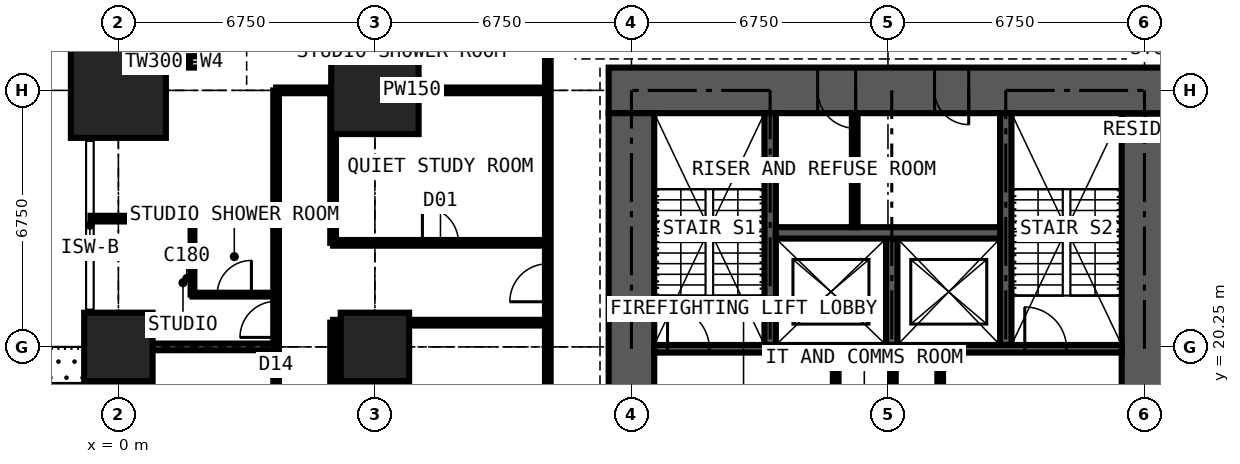
"""IFC4 building model, lengths in metres.
Left out: names, types, materials, properties, quantities, classifications, styles, units other than length and angle.
Written with IfcOpenShell. Run it as: python <this file> out.ifc"""

import sys

from ifc_helpers import new_model, si_unit, direction, frame, frame_2d, origin, origin_2d, place, context, subcontext, project, spatial, rectangle, extrude, element, fill, save


model = new_model("IFC4")
c1 = context("Model", 3, precision=1e-05, world=origin(), true_north=direction((0.0, 1.0)))
c2 = subcontext(c1, "Body", "Model", "MODEL_VIEW")
j1 = project(units=[si_unit("LENGTHUNIT", "METRE"), si_unit("PLANEANGLEUNIT", "RADIAN")], contexts=[c1])
p1 = place(None, origin())
s1 = spatial("IfcSite", under=j1, at=p1, CompositionType="ELEMENT")
p2 = place(p1, origin())
s2 = spatial("IfcBuilding", under=s1, at=p2, CompositionType="ELEMENT")
p3 = place(p2, frame((0.0, 0.0, 80.1)))
s3 = spatial("IfcBuildingStorey", under=s2, at=p3, CompositionType="ELEMENT", Elevation=80.1)
p4 = place(p3, frame((0.0, 20.25, 0.0), z_axis=(0.0, 0.0, 1.0), x_axis=(1.0, 0.0, 0.0)))
e1 = element("IfcColumn", 1, at=p4, inside=s3, PredefinedType="COLUMN", context=c2, shape_type="SweptSolid", body=[
    extrude(rectangle(XDim=1.8, YDim=1.8, at=origin_2d()), origin(), (0.0, 0.0, 1.0), 3.6),
])
p5 = place(p3, frame((0.0, 27.0, 0.0), z_axis=(0.0, 0.0, 1.0), x_axis=(1.0, 0.0, 0.0)))
e2 = element("IfcColumn", 2, at=p5, inside=s3, PredefinedType="COLUMN", context=c2, shape_type="SweptSolid", body=[
    extrude(rectangle(XDim=2.5, YDim=2.5, at=origin_2d()), origin(), (0.0, 0.0, 1.0), 3.6),
])
p6 = place(p3, frame((6.75, 20.25, 0.0), z_axis=(0.0, 0.0, 1.0), x_axis=(1.0, 0.0, 0.0)))
e3 = element("IfcColumn", 3, at=p6, inside=s3, PredefinedType="COLUMN", context=c2, shape_type="SweptSolid", body=[
    extrude(rectangle(XDim=1.8, YDim=1.8, at=origin_2d()), origin(), (0.0, 0.0, 1.0), 3.6),
])
p7 = place(p3, frame((6.75, 27.0, 0.0), z_axis=(0.0, 0.0, 1.0), x_axis=(1.0, 0.0, 0.0)))
e4 = element("IfcColumn", 4, at=p7, inside=s3, PredefinedType="COLUMN", context=c2, shape_type="SweptSolid", body=[
    extrude(rectangle(XDim=2.3, YDim=2.3, at=origin_2d()), origin(), (0.0, 0.0, 1.0), 3.6),
])
p8 = place(p3, frame((27.0, 14.1, 0.0), z_axis=(0.0, 0.0, 1.0), x_axis=(0.0, 1.0, 0.0)))
e5 = element("IfcWall", 5, at=p8, inside=s3, PredefinedType="SHEAR", context=c2, shape_type="SweptSolid", body=[
    extrude(rectangle(XDim=12.3, YDim=1.2, at=frame_2d((6.15, 0.0))), origin(), (0.0, 0.0, 1.0), 3.6),
])
p9 = place(p8, frame((3.65, 0.0, 0.0)))
e6 = element("IfcOpeningElement", 6, at=p9, cuts=e5, PredefinedType="OPENING", context=c2, shape_type="SweptSolid", body=[
    extrude(rectangle(XDim=1.2, YDim=2.2, at=frame_2d((0.6, 1.1))), frame((0.0, 0.61, 0.0), z_axis=(0.0, -1.0, 0.0), x_axis=(1.0, 0.0, 0.0)), (0.0, 0.0, 1.0), 1.22),
])
p10 = place(p3, frame((27.6, 27.0, 0.0), z_axis=(0.0, 0.0, 1.0), x_axis=(-1.0, 0.0, 0.0)))
e7 = element("IfcWall", 7, at=p10, inside=s3, PredefinedType="SHEAR", context=c2, shape_type="SweptSolid", body=[
    extrude(rectangle(XDim=14.7, YDim=1.2, at=frame_2d((7.35, 0.0))), origin(), (0.0, 0.0, 1.0), 3.6),
])
p11 = place(p10, frame((5.225, 0.0, 0.0)))
e8 = element("IfcOpeningElement", 8, at=p11, cuts=e7, PredefinedType="OPENING", context=c2, shape_type="SweptSolid", body=[
    extrude(rectangle(XDim=0.9, YDim=2.2, at=frame_2d((0.45, 1.1))), frame((0.0, 0.61, 0.0), z_axis=(0.0, -1.0, 0.0), x_axis=(1.0, 0.0, 0.0)), (0.0, 0.0, 1.0), 1.22),
])
p12 = place(p10, frame((8.2, 0.0, 0.0)))
e9 = element("IfcOpeningElement", 9, at=p12, cuts=e7, PredefinedType="OPENING", context=c2, shape_type="SweptSolid", body=[
    extrude(rectangle(XDim=1.0, YDim=2.2, at=frame_2d((0.5, 1.1))), frame((0.0, 0.61, 0.0), z_axis=(0.0, -1.0, 0.0), x_axis=(1.0, 0.0, 0.0)), (0.0, 0.0, 1.0), 1.22),
])
p13 = place(p3, frame((13.5, 26.4, 0.0), z_axis=(0.0, 0.0, 1.0), x_axis=(0.0, -1.0, 0.0)))
e10 = element("IfcWall", 10, at=p13, inside=s3, PredefinedType="SHEAR", context=c2, shape_type="SweptSolid", body=[
    extrude(rectangle(XDim=12.3, YDim=1.2, at=frame_2d((6.15, 0.0))), origin(), (0.0, 0.0, 1.0), 3.6),
])
p14 = place(p13, frame((7.45, 0.0, 0.0)))
e11 = element("IfcOpeningElement", 11, at=p14, cuts=e10, PredefinedType="OPENING", context=c2, shape_type="SweptSolid", body=[
    extrude(rectangle(XDim=1.2, YDim=2.2, at=frame_2d((0.6, 1.1))), frame((0.0, 0.61, 0.0), z_axis=(0.0, -1.0, 0.0), x_axis=(1.0, 0.0, 0.0)), (0.0, 0.0, 1.0), 1.22),
])
p15 = place(p3, frame((2.625, 31.125, 0.0), z_axis=(0.0, 0.0, 1.0), x_axis=(0.0, -1.0, 0.0)))
e12 = element("IfcWall", 12, at=p15, inside=s3, PredefinedType="SOLIDWALL", context=c2, shape_type="SweptSolid", body=[
    extrude(rectangle(XDim=3.375, YDim=0.3, at=frame_2d((1.688, 0.0))), origin(), (0.0, 0.0, 1.0), 3.375),
])
p16 = place(p15, frame((0.788, 0.0, 0.6)))
e13 = element("IfcOpeningElement", 13, at=p16, cuts=e12, PredefinedType="OPENING", context=c2, shape_type="SweptSolid", body=[
    extrude(rectangle(XDim=1.8, YDim=2.1, at=frame_2d((0.9, 1.05))), frame((0.0, 0.16, 0.0), z_axis=(0.0, -1.0, 0.0), x_axis=(1.0, 0.0, 0.0)), (0.0, 0.0, 1.0), 0.32),
])
p17 = place(p3, frame((2.625, 27.75, 0.0), z_axis=(0.0, 0.0, 1.0), x_axis=(-1.0, 0.0, 0.0)))
e14 = element("IfcWall", 14, at=p17, inside=s3, PredefinedType="SOLIDWALL", context=c2, shape_type="SweptSolid", body=[
    extrude(rectangle(XDim=3.375, YDim=0.3, at=frame_2d((1.688, 0.0))), origin(), (0.0, 0.0, 1.0), 3.375),
])
p18 = place(p17, frame((0.167, 0.0, 0.9)))
e15 = element("IfcOpeningElement", 15, at=p18, cuts=e14, PredefinedType="OPENING", context=c2, shape_type="SweptSolid", body=[
    extrude(rectangle(XDim=1.2, YDim=1.8, at=frame_2d((0.6, 0.9))), frame((0.0, 0.16, 0.0), z_axis=(0.0, -1.0, 0.0), x_axis=(1.0, 0.0, 0.0)), (0.0, 0.0, 1.0), 0.32),
])
p19 = place(p3, frame((-0.75, 13.5, 0.0), z_axis=(0.0, 0.0, 1.0), x_axis=(0.0, 1.0, 0.0)))
e16 = element("IfcWall", 16, at=p19, inside=s3, PredefinedType="SOLIDWALL", context=c2, shape_type="SweptSolid", body=[
    extrude(rectangle(XDim=6.75, YDim=0.15, at=frame_2d((3.375, 0.0))), origin(), (0.0, 0.0, 1.0), 3.375),
])
p20 = place(p19, frame((1.296, 0.0, 0.0)))
e17 = element("IfcOpeningElement", 17, at=p20, cuts=e16, PredefinedType="OPENING", context=c2, shape_type="SweptSolid", body=[
    extrude(rectangle(XDim=1.0, YDim=2.2, at=frame_2d((0.5, 1.1))), frame((0.0, 0.085, 0.0), z_axis=(0.0, -1.0, 0.0), x_axis=(1.0, 0.0, 0.0)), (0.0, 0.0, 1.0), 0.17),
])
p21 = place(p19, frame((2.342, 0.0, 0.9)))
e18 = element("IfcOpeningElement", 18, at=p21, cuts=e16, PredefinedType="OPENING", context=c2, shape_type="SweptSolid", body=[
    extrude(rectangle(XDim=0.9, YDim=1.8, at=frame_2d((0.45, 0.9))), frame((0.0, 0.085, 0.0), z_axis=(0.0, -1.0, 0.0), x_axis=(1.0, 0.0, 0.0)), (0.0, 0.0, 1.0), 0.17),
])
p22 = place(p19, frame((4.788, 0.0, 0.0)))
e19 = element("IfcOpeningElement", 19, at=p22, cuts=e16, PredefinedType="OPENING", context=c2, shape_type="SweptSolid", body=[
    extrude(rectangle(XDim=1.0, YDim=2.2, at=frame_2d((0.5, 1.1))), frame((0.0, 0.085, 0.0), z_axis=(0.0, -1.0, 0.0), x_axis=(1.0, 0.0, 0.0)), (0.0, 0.0, 1.0), 0.17),
])
p23 = place(p19, frame((3.525, 0.0, 0.9)))
e20 = element("IfcOpeningElement", 20, at=p23, cuts=e16, PredefinedType="OPENING", context=c2, shape_type="SweptSolid", body=[
    extrude(rectangle(XDim=1.2, YDim=1.8, at=frame_2d((0.6, 0.9))), frame((0.0, 0.085, 0.0), z_axis=(0.0, -1.0, 0.0), x_axis=(1.0, 0.0, 0.0)), (0.0, 0.0, 1.0), 0.17),
])
p24 = place(p3, frame((14.1, 20.2, 0.0), z_axis=(0.0, 0.0, 1.0), x_axis=(1.0, 0.0, 0.0)))
e21 = element("IfcWall", 21, at=p24, inside=s3, PredefinedType="SHEAR", context=c2, shape_type="SweptSolid", body=[
    extrude(rectangle(XDim=12.3, YDim=0.2, at=frame_2d((6.15, 0.0))), origin(), (0.0, 0.0, 1.0), 3.6),
])
p25 = place(p24, frame((0.35, 0.0, 0.0)))
e22 = element("IfcOpeningElement", 22, at=p25, cuts=e21, PredefinedType="OPENING", context=c2, shape_type="SweptSolid", body=[
    extrude(rectangle(XDim=1.1, YDim=2.2, at=frame_2d((0.55, 1.1))), frame((0.0, 0.11, 0.0), z_axis=(0.0, -1.0, 0.0), x_axis=(1.0, 0.0, 0.0)), (0.0, 0.0, 1.0), 0.22),
])
p26 = place(p24, frame((9.75, 0.0, 0.0)))
e23 = element("IfcOpeningElement", 23, at=p26, cuts=e21, PredefinedType="OPENING", context=c2, shape_type="SweptSolid", body=[
    extrude(rectangle(XDim=1.1, YDim=2.2, at=frame_2d((0.55, 1.1))), frame((0.0, 0.11, 0.0), z_axis=(0.0, -1.0, 0.0), x_axis=(1.0, 0.0, 0.0)), (0.0, 0.0, 1.0), 0.22),
])
for number, where, z_axis, x_axis in (
    (24, (17.15, 20.3, 0.0), (0.0, 0.0, 1.0), (0.0, 1.0, 0.0)),
    (25, (23.35, 20.3, 0.0), (0.0, 0.0, 1.0), (0.0, 1.0, 0.0)),
):
    element("IfcWall", number, at=place(p3, frame(where, z_axis=z_axis, x_axis=x_axis)), inside=s3, PredefinedType="SHEAR", context=c2, shape_type="SweptSolid", body=[
        extrude(rectangle(XDim=6.1, YDim=0.3, at=frame_2d((3.05, 0.0))), origin(), (0.0, 0.0, 1.0), 3.6),
    ])
p27 = place(p3, frame((20.35, 20.3, 0.0), z_axis=(0.0, 0.0, 1.0), x_axis=(0.0, 1.0, 0.0)))
e26 = element("IfcWall", 26, at=p27, inside=s3, PredefinedType="SHEAR", context=c2, shape_type="SweptSolid", body=[
    extrude(rectangle(XDim=2.8, YDim=0.3, at=frame_2d((1.4, 0.0))), origin(), (0.0, 0.0, 1.0), 3.6),
])
p28 = place(p3, frame((17.3, 23.25, 0.0), z_axis=(0.0, 0.0, 1.0), x_axis=(1.0, 0.0, 0.0)))
e27 = element("IfcWall", 27, at=p28, inside=s3, PredefinedType="SHEAR", context=c2, shape_type="SweptSolid", body=[
    extrude(rectangle(XDim=5.9, YDim=0.3, at=frame_2d((2.95, 0.0))), origin(), (0.0, 0.0, 1.0), 3.6),
])
p29 = place(p3, frame((18.875, 16.6, 0.0), z_axis=(0.0, 0.0, 1.0), x_axis=(0.0, 1.0, 0.0)))
e28 = element("IfcWall", 28, at=p29, inside=s3, PredefinedType="PARTITIONING", context=c2, shape_type="SweptSolid", body=[
    extrude(rectangle(XDim=3.5, YDim=0.15, at=frame_2d((1.75, 0.0))), origin(), (0.0, 0.0, 1.0), 3.375),
])
p30 = place(p29, frame((1.15, 0.0, 0.0)))
e29 = element("IfcOpeningElement", 29, at=p30, cuts=e28, PredefinedType="OPENING", context=c2, shape_type="SweptSolid", body=[
    extrude(rectangle(XDim=1.2, YDim=2.2, at=frame_2d((0.6, 1.1))), frame((0.0, 0.085, 0.0), z_axis=(0.0, -1.0, 0.0), x_axis=(1.0, 0.0, 0.0)), (0.0, 0.0, 1.0), 0.17),
])
p31 = place(p3, frame((21.625, 16.6, 0.0), z_axis=(0.0, 0.0, 1.0), x_axis=(0.0, 1.0, 0.0)))
e30 = element("IfcWall", 30, at=p31, inside=s3, PredefinedType="PARTITIONING", context=c2, shape_type="SweptSolid", body=[
    extrude(rectangle(XDim=3.5, YDim=0.15, at=frame_2d((1.75, 0.0))), origin(), (0.0, 0.0, 1.0), 3.375),
])
p32 = place(p31, frame((1.15, 0.0, 0.0)))
e31 = element("IfcOpeningElement", 31, at=p32, cuts=e30, PredefinedType="OPENING", context=c2, shape_type="SweptSolid", body=[
    extrude(rectangle(XDim=1.2, YDim=2.2, at=frame_2d((0.6, 1.1))), frame((0.0, 0.085, 0.0), z_axis=(0.0, -1.0, 0.0), x_axis=(1.0, 0.0, 0.0)), (0.0, 0.0, 1.0), 0.17),
])
p33 = place(p3, frame((20.38, 16.6, 0.0), z_axis=(0.0, 0.0, 1.0), x_axis=(0.0, 1.0, 0.0)))
e32 = element("IfcWall", 32, at=p33, inside=s3, PredefinedType="PARTITIONING", context=c2, shape_type="SweptSolid", body=[
    extrude(rectangle(XDim=3.5, YDim=0.15, at=frame_2d((1.75, 0.0))), origin(), (0.0, 0.0, 1.0), 3.375),
])
p34 = place(p3, frame((19.375, 23.4, 0.0), z_axis=(0.0, 0.0, 1.0), x_axis=(0.0, 1.0, 0.0)))
e33 = element("IfcWall", 33, at=p34, inside=s3, PredefinedType="PARTITIONING", context=c2, shape_type="SweptSolid", body=[
    extrude(rectangle(XDim=3.0, YDim=0.15, at=frame_2d((1.5, 0.0))), origin(), (0.0, 0.0, 1.0), 3.375),
])
p35 = place(p3, frame((-0.734, 20.25, 0.0), z_axis=(0.0, 0.0, 1.0), x_axis=(1.0, 0.0, 0.0)))
e34 = element("IfcWall", 34, at=p35, inside=s3, PredefinedType="PARTITIONING", context=c2, shape_type="SweptSolid", body=[
    extrude(rectangle(XDim=4.884, YDim=0.175, at=frame_2d((2.442, 0.0))), origin(), (0.0, 0.0, 1.0), 2.877),
])
p36 = place(p3, frame((-0.734, 23.625, 0.0), z_axis=(0.0, 0.0, 1.0), x_axis=(1.0, 0.0, 0.0)))
e35 = element("IfcWall", 35, at=p36, inside=s3, PredefinedType="PARTITIONING", context=c2, shape_type="SweptSolid", body=[
    extrude(rectangle(XDim=4.884, YDim=0.15, at=frame_2d((2.442, 0.0))), origin(), (0.0, 0.0, 1.0), 3.375),
])
p37 = place(p3, frame((1.95, 21.625, 0.0), z_axis=(0.0, 0.0, 1.0), x_axis=(0.0, 1.0, 0.0)))
e36 = element("IfcWall", 36, at=p37, inside=s3, PredefinedType="PARTITIONING", context=c2, shape_type="SweptSolid", body=[
    extrude(rectangle(XDim=2.0, YDim=0.1, at=frame_2d((1.0, 0.0))), origin(), (0.0, 0.0, 1.0), 3.375),
])
p38 = place(p3, frame((1.95, 21.625, 0.0), z_axis=(0.0, 0.0, 1.0), x_axis=(1.0, 0.0, 0.0)))
e37 = element("IfcWall", 37, at=p38, inside=s3, PredefinedType="PARTITIONING", context=c2, shape_type="SweptSolid", body=[
    extrude(rectangle(XDim=2.2, YDim=0.1, at=frame_2d((1.1, 0.0))), origin(), (0.0, 0.0, 1.0), 3.375),
])
p39 = place(p38, frame((0.65, 0.0, 0.0)))
e38 = element("IfcOpeningElement", 38, at=p39, cuts=e37, PredefinedType="OPENING", context=c2, shape_type="SweptSolid", body=[
    extrude(rectangle(XDim=0.9, YDim=2.2, at=frame_2d((0.45, 1.1))), frame((0.0, 0.06, 0.0), z_axis=(0.0, -1.0, 0.0), x_axis=(1.0, 0.0, 0.0)), (0.0, 0.0, 1.0), 0.12),
])
p40 = place(p3, frame((4.15, 10.125, 0.0), z_axis=(0.0, 0.0, 1.0), x_axis=(0.0, 1.0, 0.0)))
e39 = element("IfcWall", 39, at=p40, inside=s3, PredefinedType="PARTITIONING", context=c2, shape_type="SweptSolid", body=[
    extrude(rectangle(XDim=16.875, YDim=0.15, at=frame_2d((8.438, 0.0))), origin(), (0.0, 0.0, 1.0), 3.375),
])
p41 = place(p40, frame((7.575, 0.0, 0.0)))
e40 = element("IfcOpeningElement", 40, at=p41, cuts=e39, PredefinedType="OPENING", context=c2, shape_type="SweptSolid", body=[
    extrude(rectangle(XDim=0.95, YDim=2.2, at=frame_2d((0.475, 1.1))), frame((0.0, 0.085, 0.0), z_axis=(0.0, -1.0, 0.0), x_axis=(1.0, 0.0, 0.0)), (0.0, 0.0, 1.0), 0.17),
])
p42 = place(p40, frame((0.2, 0.0, 0.0)))
e41 = element("IfcOpeningElement", 41, at=p42, cuts=e39, PredefinedType="OPENING", context=c2, shape_type="SweptSolid", body=[
    extrude(rectangle(XDim=0.95, YDim=2.2, at=frame_2d((0.475, 1.1))), frame((0.0, 0.085, 0.0), z_axis=(0.0, -1.0, 0.0), x_axis=(1.0, 0.0, 0.0)), (0.0, 0.0, 1.0), 0.17),
])
p43 = place(p40, frame((10.375, 0.0, 0.0)))
e42 = element("IfcOpeningElement", 42, at=p43, cuts=e39, PredefinedType="OPENING", context=c2, shape_type="SweptSolid", body=[
    extrude(rectangle(XDim=0.95, YDim=2.2, at=frame_2d((0.475, 1.1))), frame((0.0, 0.085, 0.0), z_axis=(0.0, -1.0, 0.0), x_axis=(1.0, 0.0, 0.0)), (0.0, 0.0, 1.0), 0.17),
])
p44 = place(p3, frame((4.15, 27.0, 0.0), z_axis=(0.0, 0.0, 1.0), x_axis=(1.0, 0.0, 0.0)))
e43 = element("IfcWall", 43, at=p44, inside=s3, PredefinedType="PARTITIONING", context=c2, shape_type="SweptSolid", body=[
    extrude(rectangle(XDim=7.15, YDim=0.15, at=frame_2d((3.575, 0.0))), origin(), (0.0, 0.0, 1.0), 2.806),
])
p45 = place(p3, frame((5.65, 10.125, 0.0), z_axis=(0.0, 0.0, 1.0), x_axis=(0.0, 1.0, 0.0)))
e44 = element("IfcWall", 44, at=p45, inside=s3, PredefinedType="PARTITIONING", context=c2, shape_type="SweptSolid", body=[
    extrude(rectangle(XDim=10.762, YDim=0.15, at=frame_2d((5.381, 0.0))), origin(), (0.0, 0.0, 1.0), 3.375),
])
p46 = place(p45, frame((4.9, 0.0, 0.0)))
e45 = element("IfcOpeningElement", 45, at=p46, cuts=e44, PredefinedType="OPENING", context=c2, shape_type="SweptSolid", body=[
    extrude(rectangle(XDim=0.95, YDim=2.2, at=frame_2d((0.475, 1.1))), frame((0.0, 0.085, 0.0), z_axis=(0.0, -1.0, 0.0), x_axis=(1.0, 0.0, 0.0)), (0.0, 0.0, 1.0), 0.17),
])
p47 = place(p3, frame((5.65, 20.887, 0.0), z_axis=(0.0, 0.0, 1.0), x_axis=(1.0, 0.0, 0.0)))
e46 = element("IfcWall", 46, at=p47, inside=s3, PredefinedType="PARTITIONING", context=c2, shape_type="SweptSolid", body=[
    extrude(rectangle(XDim=5.65, YDim=0.15, at=frame_2d((2.825, 0.0))), origin(), (0.0, 0.0, 1.0), 3.375),
])
p48 = place(p3, frame((5.65, 22.988, 0.0), z_axis=(0.0, 0.0, 1.0), x_axis=(0.0, 1.0, 0.0)))
e47 = element("IfcWall", 47, at=p48, inside=s3, PredefinedType="PARTITIONING", context=c2, shape_type="SweptSolid", body=[
    extrude(rectangle(XDim=4.012, YDim=0.15, at=frame_2d((2.006, 0.0))), origin(), (0.0, 0.0, 1.0), 3.375),
])
p49 = place(p3, frame((5.65, 22.988, 0.0), z_axis=(0.0, 0.0, 1.0), x_axis=(1.0, 0.0, 0.0)))
e48 = element("IfcWall", 48, at=p49, inside=s3, PredefinedType="PARTITIONING", context=c2, shape_type="SweptSolid", body=[
    extrude(rectangle(XDim=5.65, YDim=0.15, at=frame_2d((2.825, 0.0))), origin(), (0.0, 0.0, 1.0), 3.375),
])
p50 = place(p49, frame((2.35, 0.0, 0.0)))
e49 = element("IfcOpeningElement", 49, at=p50, cuts=e48, PredefinedType="OPENING", context=c2, shape_type="SweptSolid", body=[
    extrude(rectangle(XDim=0.95, YDim=2.2, at=frame_2d((0.475, 1.1))), frame((0.0, 0.085, 0.0), z_axis=(0.0, -1.0, 0.0), x_axis=(1.0, 0.0, 0.0)), (0.0, 0.0, 1.0), 0.17),
])
p51 = place(p3, frame((11.3, 11.3, 0.0), z_axis=(0.0, 0.0, 1.0), x_axis=(0.0, 1.0, 0.0)))
e50 = element("IfcWall", 50, at=p51, inside=s3, PredefinedType="PARTITIONING", context=c2, shape_type="SweptSolid", body=[
    extrude(rectangle(XDim=19.3, YDim=0.15, at=frame_2d((9.65, 0.0))), origin(), (0.0, 0.0, 1.0), 3.375),
])
p52 = place(p51, frame((18.1, 0.0, 0.0)))
e51 = element("IfcOpeningElement", 51, at=p52, cuts=e50, PredefinedType="OPENING", context=c2, shape_type="SweptSolid", body=[
    extrude(rectangle(XDim=1.0, YDim=2.2, at=frame_2d((0.5, 1.1))), frame((0.0, 0.085, 0.0), z_axis=(0.0, -1.0, 0.0), x_axis=(1.0, 0.0, 0.0)), (0.0, 0.0, 1.0), 0.17),
])
p53 = place(p51, frame((10.137, 0.0, 0.0)))
e52 = element("IfcOpeningElement", 52, at=p53, cuts=e50, PredefinedType="OPENING", context=c2, shape_type="SweptSolid", body=[
    extrude(rectangle(XDim=1.0, YDim=2.2, at=frame_2d((0.5, 1.1))), frame((0.0, 0.085, 0.0), z_axis=(0.0, -1.0, 0.0), x_axis=(1.0, 0.0, 0.0)), (0.0, 0.0, 1.0), 0.17),
])
p54 = place(p18, origin())
e53 = element("IfcWindow", 53, at=p54, inside=s3, PartitioningType="SINGLE_PANEL", PredefinedType="WINDOW", context=c2, shape_type="SweptSolid", body=[
    extrude(rectangle(XDim=1.2, YDim=1.8, at=frame_2d((0.6, 0.9))), frame((0.0, 0.03, 0.0), z_axis=(0.0, -1.0, 0.0), x_axis=(1.0, 0.0, 0.0)), (0.0, 0.0, 1.0), 0.06),
])
fill(e15, e53)
p55 = place(p22, origin())
e54 = element("IfcDoor", 54, at=p55, inside=s3, OperationType="SINGLE_SWING_RIGHT", PredefinedType="DOOR", context=c2, shape_type="SweptSolid", body=[
    extrude(rectangle(XDim=1.0, YDim=2.2, at=frame_2d((0.5, 1.1))), frame((0.0, 0.025, 0.0), z_axis=(0.0, -1.0, 0.0), x_axis=(1.0, 0.0, 0.0)), (0.0, 0.0, 1.0), 0.05),
])
fill(e19, e54)
p56 = place(p11, origin())
e55 = element("IfcDoor", 55, at=p56, inside=s3, OperationType="SINGLE_SWING_LEFT", PredefinedType="DOOR", context=c2, shape_type="SweptSolid", body=[
    extrude(rectangle(XDim=0.9, YDim=2.2, at=frame_2d((0.45, 1.1))), frame((0.0, 0.4, 0.0), z_axis=(0.0, -1.0, 0.0), x_axis=(1.0, 0.0, 0.0)), (0.0, 0.0, 1.0), 0.8),
])
fill(e8, e55)
p57 = place(p12, origin())
e56 = element("IfcDoor", 56, at=p57, inside=s3, OperationType="SINGLE_SWING_LEFT", PredefinedType="DOOR", context=c2, shape_type="SweptSolid", body=[
    extrude(rectangle(XDim=1.0, YDim=2.2, at=frame_2d((0.5, 1.1))), frame((0.0, 0.025, 0.0), z_axis=(0.0, -1.0, 0.0), x_axis=(1.0, 0.0, 0.0)), (0.0, 0.0, 1.0), 0.05),
])
fill(e9, e56)
p58 = place(p25, origin())
e57 = element("IfcDoor", 57, at=p58, inside=s3, OperationType="SINGLE_SWING_LEFT", PredefinedType="DOOR", context=c2, shape_type="SweptSolid", body=[
    extrude(rectangle(XDim=1.1, YDim=2.2, at=frame_2d((0.55, 1.1))), frame((0.0, 0.025, 0.0), z_axis=(0.0, -1.0, 0.0), x_axis=(1.0, 0.0, 0.0)), (0.0, 0.0, 1.0), 0.05),
])
fill(e22, e57)
p59 = place(p26, origin())
e58 = element("IfcDoor", 58, at=p59, inside=s3, OperationType="SINGLE_SWING_LEFT", PredefinedType="DOOR", context=c2, shape_type="SweptSolid", body=[
    extrude(rectangle(XDim=1.1, YDim=2.2, at=frame_2d((0.55, 1.1))), frame((0.0, 0.025, 0.0), z_axis=(0.0, -1.0, 0.0), x_axis=(1.0, 0.0, 0.0)), (0.0, 0.0, 1.0), 0.05),
])
fill(e23, e58)
p60 = place(p43, origin())
e59 = element("IfcDoor", 59, at=p60, inside=s3, OperationType="SINGLE_SWING_LEFT", PredefinedType="DOOR", context=c2, shape_type="SweptSolid", body=[
    extrude(rectangle(XDim=0.95, YDim=2.2, at=frame_2d((0.475, 1.1))), frame((0.0, 0.025, 0.0), z_axis=(0.0, -1.0, 0.0), x_axis=(1.0, 0.0, 0.0)), (0.0, 0.0, 1.0), 0.05),
])
fill(e42, e59)
p61 = place(p39, origin())
e60 = element("IfcDoor", 60, at=p61, inside=s3, OperationType="SINGLE_SWING_RIGHT", PredefinedType="DOOR", context=c2, shape_type="SweptSolid", body=[
    extrude(rectangle(XDim=0.9, YDim=2.2, at=frame_2d((0.45, 1.1))), frame((0.0, 0.025, 0.0), z_axis=(0.0, -1.0, 0.0), x_axis=(1.0, 0.0, 0.0)), (0.0, 0.0, 1.0), 0.05),
])
fill(e38, e60)
p62 = place(p53, origin())
e61 = element("IfcDoor", 61, at=p62, inside=s3, OperationType="SINGLE_SWING_LEFT", PredefinedType="DOOR", context=c2, shape_type="SweptSolid", body=[
    extrude(rectangle(XDim=1.0, YDim=2.2, at=frame_2d((0.5, 1.1))), frame((0.0, 0.025, 0.0), z_axis=(0.0, -1.0, 0.0), x_axis=(1.0, 0.0, 0.0)), (0.0, 0.0, 1.0), 0.05),
])
fill(e52, e61)
p63 = place(p50, origin())
e62 = element("IfcDoor", 62, at=p63, inside=s3, OperationType="SINGLE_SWING_LEFT", PredefinedType="DOOR", context=c2, shape_type="SweptSolid", body=[
    extrude(rectangle(XDim=0.95, YDim=2.2, at=frame_2d((0.475, 1.1))), frame((0.0, 0.025, 0.0), z_axis=(0.0, -1.0, 0.0), x_axis=(1.0, 0.0, 0.0)), (0.0, 0.0, 1.0), 0.05),
])
fill(e49, e62)
save(model, sys.argv[1])
